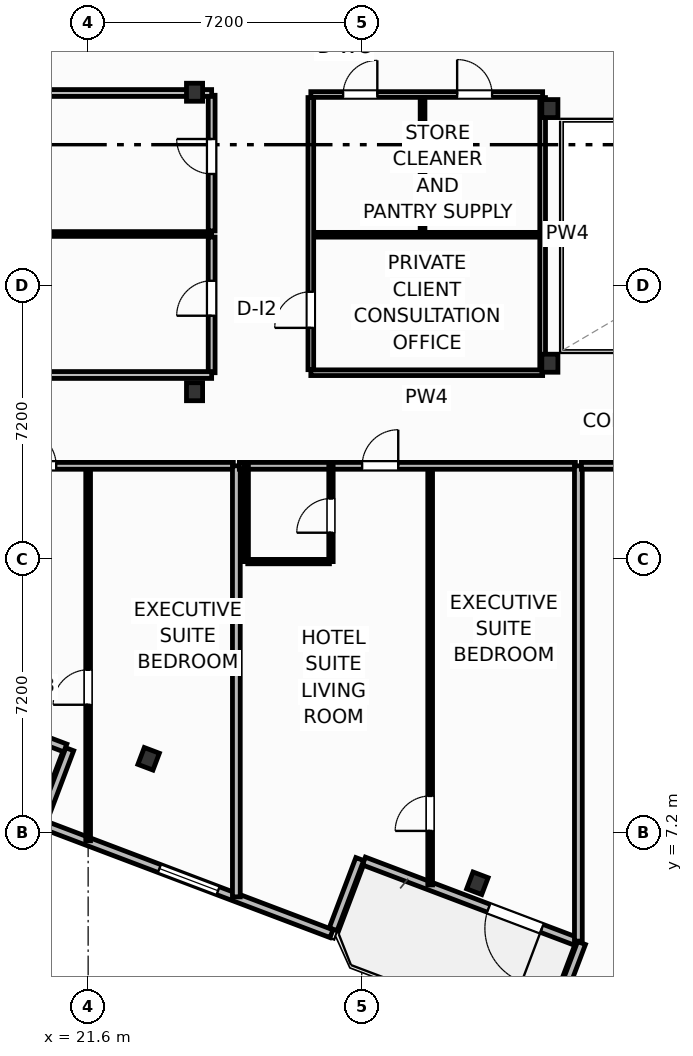
"""IFC4 building model, lengths in metres.
Left out: names, types, materials, properties, quantities, classifications, styles, units other than length and angle.
Written with IfcOpenShell. Run it as: python <this file> out.ifc"""

import sys

from ifc_helpers import new_model, si_unit, direction, frame, frame_2d, origin, origin_2d, place, context, subcontext, project, spatial, rectangle, i_section, extrude, element, fill, save


model = new_model("IFC4")
c1 = context("Model", 3, precision=1e-05, world=origin(), true_north=direction((0.0, 1.0)))
c2 = subcontext(c1, "Body", "Model", "MODEL_VIEW")
j1 = project(units=[si_unit("LENGTHUNIT", "METRE"), si_unit("PLANEANGLEUNIT", "RADIAN")], contexts=[c1])
p1 = place(None, origin())
s1 = spatial("IfcSite", under=j1, at=p1, CompositionType="ELEMENT")
p2 = place(p1, origin())
s2 = spatial("IfcBuilding", under=s1, at=p2, CompositionType="ELEMENT")
p3 = place(p2, frame((0.0, 0.0, 79.9)))
s3 = spatial("IfcBuildingStorey", under=s2, at=p3, CompositionType="ELEMENT", Elevation=79.9)
for number, where, z_axis, x_axis in (
    (1, (33.75, 19.55, 0.0), (0.0, 0.0, 1.0), (1.0, 0.0, 0.0)),
    (2, (33.75, 26.25, 0.0), (0.0, 0.0, 1.0), (1.0, 0.0, 0.0)),
    (3, (24.4, 18.8, 0.0), (0.0, 0.0, 1.0), (1.0, 0.0, 0.0)),
    (4, (24.4, 26.68, 0.0), (0.0, 0.0, 1.0), (1.0, 0.0, 0.0)),
    (5, (23.192, 9.141, 0.0), (0.0, 0.0, 1.0), (0.935, -0.354, 0.0)),
    (6, (31.843, 5.866, 0.0), (0.0, 0.0, 1.0), (0.935, -0.354, 0.0)),
):
    element("IfcColumn", number, at=place(p3, frame(where, z_axis=z_axis, x_axis=x_axis)), inside=s3, PredefinedType="COLUMN", context=c2, shape_type="SweptSolid", body=[
        extrude(i_section(OverallWidth=0.424, OverallDepth=0.474, WebThickness=0.048, FlangeThickness=0.077, FilletRadius=0.025, at=origin_2d()), origin(), (0.0, 0.0, 1.0), 3.7),
    ])
p4 = place(p3, frame((21.0, 9.425, 0.0), z_axis=(0.0, 0.0, 1.0), x_axis=(-0.93521416643, 0.354082565101, 0.0)))
e7 = element("IfcWall", 7, at=p4, inside=s3, PredefinedType="SOLIDWALL", context=c2, shape_type="SweptSolid", body=[
    extrude(rectangle(XDim=6.0, YDim=0.22, at=frame_2d((3.0, 0.0))), origin(), (0.0, 0.0, 1.0), 2.73),
])
p5 = place(p4, frame((2.176, 0.0, 0.0)))
e8 = element("IfcOpeningElement", 8, at=p5, cuts=e7, PredefinedType="OPENING", context=c2, shape_type="SweptSolid", body=[
    extrude(rectangle(XDim=1.5, YDim=2.25, at=frame_2d((0.75, 1.125))), frame((0.0, 0.12, 0.0), z_axis=(0.0, -1.0, 0.0), x_axis=(1.0, 0.0, 0.0)), (0.0, 0.0, 1.0), 0.24),
])
p6 = place(p3, frame((34.468, 4.327, 0.0), z_axis=(0.0, 0.0, 1.0), x_axis=(-0.9352192676, 0.354069091436, 0.0)))
e9 = element("IfcWall", 9, at=p6, inside=s3, PredefinedType="SOLIDWALL", context=c2, shape_type="SweptSolid", body=[
    extrude(rectangle(XDim=6.0, YDim=0.22, at=frame_2d((3.0, 0.0))), origin(), (0.0, 0.0, 1.0), 2.73),
])
p7 = place(p6, frame((0.992, 0.0, 0.0)))
e10 = element("IfcOpeningElement", 10, at=p7, cuts=e9, PredefinedType="OPENING", context=c2, shape_type="SweptSolid", body=[
    extrude(rectangle(XDim=1.5, YDim=2.25, at=frame_2d((0.75, 1.125))), frame((0.0, 0.12, 0.0), z_axis=(0.0, -1.0, 0.0), x_axis=(1.0, 0.0, 0.0)), (0.0, 0.0, 1.0), 0.24),
])
p8 = place(p3, frame((21.116, 9.392, 0.0), z_axis=(0.0, 0.0, 1.0), x_axis=(-0.353988291547, -0.935249854022, 0.0)))
e11 = element("IfcWall", 11, at=p8, inside=s3, PredefinedType="SOLIDWALL", context=c2, shape_type="SweptSolid", body=[
    extrude(rectangle(XDim=2.1, YDim=0.22, at=frame_2d((1.05, 0.0))), origin(), (0.0, 0.0, 1.0), 2.73),
])
p9 = place(p3, frame((20.49, 7.384, 0.0), z_axis=(0.0, 0.0, 1.0), x_axis=(0.935230796934, -0.354038636968, 0.0)))
e12 = element("IfcWall", 12, at=p9, inside=s3, PredefinedType="SOLIDWALL", context=c2, shape_type="SweptSolid", body=[
    extrude(rectangle(XDim=8.035, YDim=0.22, at=frame_2d((4.018, 0.0))), origin(), (0.0, 0.0, 1.0), 2.73),
])
p10 = place(p9, frame((3.192, 0.0, 0.8)))
e13 = element("IfcOpeningElement", 13, at=p10, cuts=e12, PredefinedType="OPENING", context=c2, shape_type="SweptSolid", body=[
    extrude(rectangle(XDim=1.65, YDim=1.65, at=frame_2d((0.825, 0.825))), frame((0.0, 0.12, 0.0), z_axis=(0.0, -1.0, 0.0), x_axis=(1.0, 0.0, 0.0)), (0.0, 0.0, 1.0), 0.24),
])
p11 = place(p3, frame((28.048, 4.656, 0.0), z_axis=(0.0, 0.0, 1.0), x_axis=(0.354128791944, 0.935196663123, 0.0)))
e14 = element("IfcWall", 14, at=p11, inside=s3, PredefinedType="SOLIDWALL", context=c2, shape_type="SweptSolid", body=[
    extrude(rectangle(XDim=1.975, YDim=0.22, at=frame_2d((0.988, 0.0))), origin(), (0.0, 0.0, 1.0), 2.73),
])
p12 = place(p3, frame((34.583, 4.294, 0.0), z_axis=(0.0, 0.0, 1.0), x_axis=(-0.354128469405, -0.935196785258, 0.0)))
e15 = element("IfcWall", 15, at=p12, inside=s3, PredefinedType="SOLIDWALL", context=c2, shape_type="SweptSolid", body=[
    extrude(rectangle(XDim=2.1, YDim=0.22, at=frame_2d((1.05, 0.0))), origin(), (0.0, 0.0, 1.0), 2.73),
])
p13 = place(p3, frame((21.6, 6.985, 0.0), z_axis=(0.0, 0.0, 1.0), x_axis=(0.0, 1.0, 0.0)))
e16 = element("IfcWall", 16, at=p13, inside=s3, PredefinedType="PARTITIONING", context=c2, shape_type="SweptSolid", body=[
    extrude(rectangle(XDim=9.865, YDim=0.125, at=frame_2d((4.933, 0.0))), origin(), (0.0, 0.0, 1.0), 3.45),
])
p14 = place(p13, frame((3.578, 0.0, 0.0)))
e17 = element("IfcOpeningElement", 17, at=p14, cuts=e16, PredefinedType="OPENING", context=c2, shape_type="SweptSolid", body=[
    extrude(rectangle(XDim=0.92, YDim=2.05, at=frame_2d((0.46, 1.025))), frame((0.0, 0.073, 0.0), z_axis=(0.0, -1.0, 0.0), x_axis=(1.0, 0.0, 0.0)), (0.0, 0.0, 1.0), 0.145),
])
p15 = place(p3, frame((16.58, 16.85, 0.0), z_axis=(0.0, 0.0, 1.0), x_axis=(1.0, 0.0, 0.0)))
e18 = element("IfcWall", 18, at=p15, inside=s3, PredefinedType="PARTITIONING", context=c2, shape_type="SweptSolid", body=[
    extrude(rectangle(XDim=8.84, YDim=0.18, at=frame_2d((4.42, 0.0))), origin(), (0.0, 0.0, 1.0), 3.45),
])
p16 = place(p15, frame((3.23, 0.0, 0.0)))
e19 = element("IfcOpeningElement", 19, at=p16, cuts=e18, PredefinedType="OPENING", context=c2, shape_type="SweptSolid", body=[
    extrude(rectangle(XDim=0.95, YDim=2.15, at=frame_2d((0.475, 1.075))), frame((0.0, 0.1, 0.0), z_axis=(0.0, -1.0, 0.0), x_axis=(1.0, 0.0, 0.0)), (0.0, 0.0, 1.0), 0.2),
])
p17 = place(p3, frame((25.5, 5.509, 0.0), z_axis=(0.0, 0.0, 1.0), x_axis=(0.0, 1.0, 0.0)))
e20 = element("IfcWall", 20, at=p17, inside=s3, PredefinedType="PARTITIONING", context=c2, shape_type="SweptSolid", body=[
    extrude(rectangle(XDim=11.342, YDim=0.205, at=frame_2d((5.671, 0.0))), origin(), (0.0, 0.0, 1.0), 3.45),
])
p18 = place(p3, frame((30.6, 5.823, 0.0), z_axis=(0.0, 0.0, 1.0), x_axis=(0.0, 1.0, 0.0)))
e21 = element("IfcWall", 21, at=p18, inside=s3, PredefinedType="PARTITIONING", context=c2, shape_type="SweptSolid", body=[
    extrude(rectangle(XDim=11.027, YDim=0.125, at=frame_2d((5.513, 0.0))), origin(), (0.0, 0.0, 1.0), 3.45),
])
p19 = place(p18, frame((1.42, 0.0, 0.0)))
e22 = element("IfcOpeningElement", 22, at=p19, cuts=e21, PredefinedType="OPENING", context=c2, shape_type="SweptSolid", body=[
    extrude(rectangle(XDim=0.92, YDim=2.05, at=frame_2d((0.46, 1.025))), frame((0.0, 0.073, 0.0), z_axis=(0.0, -1.0, 0.0), x_axis=(1.0, 0.0, 0.0)), (0.0, 0.0, 1.0), 0.145),
])
p20 = place(p3, frame((25.58, 16.85, 0.0), z_axis=(0.0, 0.0, 1.0), x_axis=(1.0, 0.0, 0.0)))
e23 = element("IfcWall", 23, at=p20, inside=s3, PredefinedType="PARTITIONING", context=c2, shape_type="SweptSolid", body=[
    extrude(rectangle(XDim=8.84, YDim=0.18, at=frame_2d((4.42, 0.0))), origin(), (0.0, 0.0, 1.0), 3.45),
])
p21 = place(p20, frame((3.23, 0.0, 0.0)))
e24 = element("IfcOpeningElement", 24, at=p21, cuts=e23, PredefinedType="OPENING", context=c2, shape_type="SweptSolid", body=[
    extrude(rectangle(XDim=0.95, YDim=2.15, at=frame_2d((0.475, 1.075))), frame((0.0, 0.1, 0.0), z_axis=(0.0, -1.0, 0.0), x_axis=(1.0, 0.0, 0.0)), (0.0, 0.0, 1.0), 0.2),
])
p22 = place(p3, frame((25.8, 14.33, 0.0), z_axis=(0.0, 0.0, 1.0), x_axis=(1.0, 0.0, 0.0)))
e25 = element("IfcWall", 25, at=p22, inside=s3, PredefinedType="PARTITIONING", context=c2, shape_type="SweptSolid", body=[
    extrude(rectangle(XDim=2.15, YDim=0.115, at=frame_2d((1.075, 0.0))), origin(), (0.0, 0.0, 1.0), 3.45),
])
p23 = place(p3, frame((27.99, 14.33, 0.0), z_axis=(0.0, 0.0, 1.0), x_axis=(0.0, 1.0, 0.0)))
e26 = element("IfcWall", 26, at=p23, inside=s3, PredefinedType="PARTITIONING", context=c2, shape_type="SweptSolid", body=[
    extrude(rectangle(XDim=2.52, YDim=0.115, at=frame_2d((1.26, 0.0))), origin(), (0.0, 0.0, 1.0), 3.45),
])
p24 = place(p23, frame((0.76, 0.0, 0.0)))
e27 = element("IfcOpeningElement", 27, at=p24, cuts=e26, PredefinedType="OPENING", context=c2, shape_type="SweptSolid", body=[
    extrude(rectangle(XDim=0.9, YDim=2.05, at=frame_2d((0.45, 1.025))), frame((0.0, 0.067, 0.0), z_axis=(0.0, -1.0, 0.0), x_axis=(1.0, 0.0, 0.0)), (0.0, 0.0, 1.0), 0.135),
])
p25 = place(p3, frame((25.76, 14.33, 0.0), z_axis=(0.0, 0.0, 1.0), x_axis=(0.0, 1.0, 0.0)))
e28 = element("IfcWall", 28, at=p25, inside=s3, PredefinedType="PARTITIONING", context=c2, shape_type="SweptSolid", body=[
    extrude(rectangle(XDim=2.52, YDim=0.115, at=frame_2d((1.26, 0.0))), origin(), (0.0, 0.0, 1.0), 3.45),
])
p26 = place(p3, frame((34.5, 4.344, 0.0), z_axis=(0.0, 0.0, 1.0), x_axis=(0.0, 1.0, 0.0)))
e29 = element("IfcWall", 29, at=p26, inside=s3, PredefinedType="PARTITIONING", context=c2, shape_type="SweptSolid", body=[
    extrude(rectangle(XDim=12.506, YDim=0.205, at=frame_2d((6.253, 0.0))), origin(), (0.0, 0.0, 1.0), 3.45),
])
p27 = place(p3, frame((34.58, 16.85, 0.0), z_axis=(0.0, 0.0, 1.0), x_axis=(1.0, 0.0, 0.0)))
e30 = element("IfcWall", 30, at=p27, inside=s3, PredefinedType="PARTITIONING", context=c2, shape_type="SweptSolid", body=[
    extrude(rectangle(XDim=8.84, YDim=0.18, at=frame_2d((4.42, 0.0))), origin(), (0.0, 0.0, 1.0), 3.45),
])
p28 = place(p27, frame((0.918, 0.0, 0.0)))
e31 = element("IfcOpeningElement", 31, at=p28, cuts=e30, PredefinedType="OPENING", context=c2, shape_type="SweptSolid", body=[
    extrude(rectangle(XDim=0.95, YDim=2.15, at=frame_2d((0.475, 1.075))), frame((0.0, 0.1, 0.0), z_axis=(0.0, -1.0, 0.0), x_axis=(1.0, 0.0, 0.0)), (0.0, 0.0, 1.0), 0.2),
])
p29 = place(p3, frame((24.85, 19.3, 0.0), z_axis=(0.0, 0.0, 1.0), x_axis=(0.0, 1.0, 0.0)))
e32 = element("IfcWall", 32, at=p29, inside=s3, PredefinedType="PARTITIONING", context=c2, shape_type="SweptSolid", body=[
    extrude(rectangle(XDim=3.57, YDim=0.18, at=frame_2d((1.785, 0.0))), origin(), (0.0, 0.0, 1.0), 3.45),
])
p30 = place(p29, frame((1.5, 0.0, 0.0)))
e33 = element("IfcOpeningElement", 33, at=p30, cuts=e32, PredefinedType="OPENING", context=c2, shape_type="SweptSolid", body=[
    extrude(rectangle(XDim=0.92, YDim=2.05, at=frame_2d((0.46, 1.025))), frame((0.0, 0.1, 0.0), z_axis=(0.0, -1.0, 0.0), x_axis=(1.0, 0.0, 0.0)), (0.0, 0.0, 1.0), 0.2),
])
p31 = place(p3, frame((24.85, 23.03, 0.0), z_axis=(0.0, 0.0, 1.0), x_axis=(0.0, 1.0, 0.0)))
e34 = element("IfcWall", 34, at=p31, inside=s3, PredefinedType="PARTITIONING", context=c2, shape_type="SweptSolid", body=[
    extrude(rectangle(XDim=3.57, YDim=0.18, at=frame_2d((1.785, 0.0))), origin(), (0.0, 0.0, 1.0), 3.45),
])
p32 = place(p31, frame((1.5, 0.0, 0.0)))
e35 = element("IfcOpeningElement", 35, at=p32, cuts=e34, PredefinedType="OPENING", context=c2, shape_type="SweptSolid", body=[
    extrude(rectangle(XDim=0.92, YDim=2.05, at=frame_2d((0.46, 1.025))), frame((0.0, 0.1, 0.0), z_axis=(0.0, -1.0, 0.0), x_axis=(1.0, 0.0, 0.0)), (0.0, 0.0, 1.0), 0.2),
])
p33 = place(p3, frame((1.0, 22.95, 0.0), z_axis=(0.0, 0.0, 1.0), x_axis=(1.0, 0.0, 0.0)))
e36 = element("IfcWall", 36, at=p33, inside=s3, PredefinedType="PARTITIONING", context=c2, shape_type="SweptSolid", body=[
    extrude(rectangle(XDim=23.85, YDim=0.125, at=frame_2d((11.925, 0.0))), origin(), (0.0, 0.0, 1.0), 3.45),
])
p34 = place(p3, frame((0.2, 19.24, 0.0), z_axis=(0.0, 0.0, 1.0), x_axis=(1.0, 0.0, 0.0)))
e37 = element("IfcWall", 37, at=p34, inside=s3, PredefinedType="PARTITIONING", context=c2, shape_type="SweptSolid", body=[
    extrude(rectangle(XDim=24.65, YDim=0.18, at=frame_2d((12.325, 0.0))), origin(), (0.0, 0.0, 1.0), 3.45),
])
p35 = place(p3, frame((-0.086, 26.66, 0.0), z_axis=(0.0, 0.0, 1.0), x_axis=(1.0, 0.0, 0.0)))
e38 = element("IfcWall", 38, at=p35, inside=s3, PredefinedType="PARTITIONING", context=c2, shape_type="SweptSolid", body=[
    extrude(rectangle(XDim=24.936, YDim=0.18, at=frame_2d((12.468, 0.0))), origin(), (0.0, 0.0, 1.0), 2.662),
])
p36 = place(p3, frame((27.46, 19.3, 0.0), z_axis=(0.0, 0.0, 1.0), x_axis=(1.0, 0.0, 0.0)))
e39 = element("IfcWall", 39, at=p36, inside=s3, PredefinedType="PARTITIONING", context=c2, shape_type="SweptSolid", body=[
    extrude(rectangle(XDim=6.1, YDim=0.15, at=frame_2d((3.05, 0.0))), origin(), (0.0, 0.0, 1.0), 2.662),
])
p37 = place(p3, frame((27.46, 26.62, 0.0), z_axis=(0.0, 0.0, 1.0), x_axis=(1.0, 0.0, 0.0)))
e40 = element("IfcWall", 40, at=p37, inside=s3, PredefinedType="PARTITIONING", context=c2, shape_type="SweptSolid", body=[
    extrude(rectangle(XDim=6.1, YDim=0.15, at=frame_2d((3.05, 0.0))), origin(), (0.0, 0.0, 1.0), 2.662),
])
p38 = place(p37, frame((0.85, 0.0, 0.0)))
e41 = element("IfcOpeningElement", 41, at=p38, cuts=e40, PredefinedType="OPENING", context=c2, shape_type="SweptSolid", body=[
    extrude(rectangle(XDim=0.9, YDim=2.05, at=frame_2d((0.45, 1.025))), frame((0.0, 0.085, 0.0), z_axis=(0.0, -1.0, 0.0), x_axis=(1.0, 0.0, 0.0)), (0.0, 0.0, 1.0), 0.17),
])
p39 = place(p37, frame((3.85, 0.0, 0.0)))
e42 = element("IfcOpeningElement", 42, at=p39, cuts=e40, PredefinedType="OPENING", context=c2, shape_type="SweptSolid", body=[
    extrude(rectangle(XDim=0.92, YDim=2.05, at=frame_2d((0.46, 1.025))), frame((0.0, 0.085, 0.0), z_axis=(0.0, -1.0, 0.0), x_axis=(1.0, 0.0, 0.0)), (0.0, 0.0, 1.0), 0.17),
])
p40 = place(p3, frame((27.52, 22.93, 0.0), z_axis=(0.0, 0.0, 1.0), x_axis=(1.0, 0.0, 0.0)))
e43 = element("IfcWall", 43, at=p40, inside=s3, PredefinedType="PARTITIONING", context=c2, shape_type="SweptSolid", body=[
    extrude(rectangle(XDim=6.0, YDim=0.125, at=frame_2d((3.0, 0.0))), origin(), (0.0, 0.0, 1.0), 3.45),
])
p41 = place(p3, frame((30.4, 23.0, 0.0), z_axis=(0.0, 0.0, 1.0), x_axis=(0.0, 1.0, 0.0)))
e44 = element("IfcWall", 44, at=p41, inside=s3, PredefinedType="PARTITIONING", context=c2, shape_type="SweptSolid", body=[
    extrude(rectangle(XDim=3.54, YDim=0.125, at=frame_2d((1.77, 0.0))), origin(), (0.0, 0.0, 1.0), 3.45),
])
p42 = place(p3, frame((27.46, 19.38, 0.0), z_axis=(0.0, 0.0, 1.0), x_axis=(0.0, 1.0, 0.0)))
e45 = element("IfcWall", 45, at=p42, inside=s3, PredefinedType="PARTITIONING", context=c2, shape_type="SweptSolid", body=[
    extrude(rectangle(XDim=7.16, YDim=0.15, at=frame_2d((3.58, 0.0))), origin(), (0.0, 0.0, 1.0), 3.45),
])
p43 = place(p42, frame((1.1, 0.0, 0.0)))
e46 = element("IfcOpeningElement", 46, at=p43, cuts=e45, PredefinedType="OPENING", context=c2, shape_type="SweptSolid", body=[
    extrude(rectangle(XDim=0.95, YDim=2.05, at=frame_2d((0.475, 1.025))), frame((0.0, 0.085, 0.0), z_axis=(0.0, -1.0, 0.0), x_axis=(1.0, 0.0, 0.0)), (0.0, 0.0, 1.0), 0.17),
])
p44 = place(p3, frame((33.56, 19.38, 0.0), z_axis=(0.0, 0.0, 1.0), x_axis=(0.0, 1.0, 0.0)))
e47 = element("IfcWall", 47, at=p44, inside=s3, PredefinedType="PARTITIONING", context=c2, shape_type="SweptSolid", body=[
    extrude(rectangle(XDim=7.16, YDim=0.15, at=frame_2d((3.58, 0.0))), origin(), (0.0, 0.0, 1.0), 2.824),
])
p45 = place(p7, origin())
e48 = element("IfcDoor", 48, at=p45, inside=s3, OperationType="SINGLE_SWING_LEFT", PredefinedType="DOOR", context=c2, shape_type="SweptSolid", body=[
    extrude(rectangle(XDim=1.5, YDim=2.25, at=frame_2d((0.75, 1.125))), frame((0.0, 0.025, 0.0), z_axis=(0.0, -1.0, 0.0), x_axis=(1.0, 0.0, 0.0)), (0.0, 0.0, 1.0), 0.05),
])
fill(e10, e48)
p46 = place(p10, origin())
e49 = element("IfcWindow", 49, at=p46, inside=s3, PartitioningType="SINGLE_PANEL", PredefinedType="WINDOW", context=c2, shape_type="SweptSolid", body=[
    extrude(rectangle(XDim=1.65, YDim=1.65, at=frame_2d((0.825, 0.825))), frame((0.0, 0.03, 0.0), z_axis=(0.0, -1.0, 0.0), x_axis=(1.0, 0.0, 0.0)), (0.0, 0.0, 1.0), 0.06),
])
fill(e13, e49)
p47 = place(p14, origin())
e50 = element("IfcDoor", 50, at=p47, inside=s3, OperationType="SINGLE_SWING_LEFT", PredefinedType="DOOR", context=c2, shape_type="SweptSolid", body=[
    extrude(rectangle(XDim=0.92, YDim=2.05, at=frame_2d((0.46, 1.025))), frame((0.0, 0.025, 0.0), z_axis=(0.0, -1.0, 0.0), x_axis=(1.0, 0.0, 0.0)), (0.0, 0.0, 1.0), 0.05),
])
fill(e17, e50)
p48 = place(p16, origin())
e51 = element("IfcDoor", 51, at=p48, inside=s3, OperationType="SINGLE_SWING_LEFT", PredefinedType="DOOR", context=c2, shape_type="SweptSolid", body=[
    extrude(rectangle(XDim=0.95, YDim=2.15, at=frame_2d((0.475, 1.075))), frame((0.0, 0.025, 0.0), z_axis=(0.0, -1.0, 0.0), x_axis=(1.0, 0.0, 0.0)), (0.0, 0.0, 1.0), 0.05),
])
fill(e19, e51)
p49 = place(p19, origin())
e52 = element("IfcDoor", 52, at=p49, inside=s3, OperationType="SINGLE_SWING_LEFT", PredefinedType="DOOR", context=c2, shape_type="SweptSolid", body=[
    extrude(rectangle(XDim=0.92, YDim=2.05, at=frame_2d((0.46, 1.025))), frame((0.0, 0.025, 0.0), z_axis=(0.0, -1.0, 0.0), x_axis=(1.0, 0.0, 0.0)), (0.0, 0.0, 1.0), 0.05),
])
fill(e22, e52)
p50 = place(p21, origin())
e53 = element("IfcDoor", 53, at=p50, inside=s3, OperationType="SINGLE_SWING_RIGHT", PredefinedType="DOOR", context=c2, shape_type="SweptSolid", body=[
    extrude(rectangle(XDim=0.95, YDim=2.15, at=frame_2d((0.475, 1.075))), frame((0.0, 0.025, 0.0), z_axis=(0.0, -1.0, 0.0), x_axis=(1.0, 0.0, 0.0)), (0.0, 0.0, 1.0), 0.05),
])
fill(e24, e53)
p51 = place(p24, origin())
e54 = element("IfcDoor", 54, at=p51, inside=s3, OperationType="SINGLE_SWING_LEFT", PredefinedType="DOOR", context=c2, shape_type="SweptSolid", body=[
    extrude(rectangle(XDim=0.9, YDim=2.05, at=frame_2d((0.45, 1.025))), frame((0.0, 0.025, 0.0), z_axis=(0.0, -1.0, 0.0), x_axis=(1.0, 0.0, 0.0)), (0.0, 0.0, 1.0), 0.05),
])
fill(e27, e54)
p52 = place(p30, origin())
e55 = element("IfcDoor", 55, at=p52, inside=s3, OperationType="SINGLE_SWING_LEFT", PredefinedType="DOOR", context=c2, shape_type="SweptSolid", body=[
    extrude(rectangle(XDim=0.92, YDim=2.05, at=frame_2d((0.46, 1.025))), frame((0.0, 0.025, 0.0), z_axis=(0.0, -1.0, 0.0), x_axis=(1.0, 0.0, 0.0)), (0.0, 0.0, 1.0), 0.05),
])
fill(e33, e55)
p53 = place(p32, origin())
e56 = element("IfcDoor", 56, at=p53, inside=s3, OperationType="SINGLE_SWING_RIGHT", PredefinedType="DOOR", context=c2, shape_type="SweptSolid", body=[
    extrude(rectangle(XDim=0.92, YDim=2.05, at=frame_2d((0.46, 1.025))), frame((0.0, 0.025, 0.0), z_axis=(0.0, -1.0, 0.0), x_axis=(1.0, 0.0, 0.0)), (0.0, 0.0, 1.0), 0.05),
])
fill(e35, e56)
p54 = place(p38, origin())
e57 = element("IfcDoor", 57, at=p54, inside=s3, OperationType="SINGLE_SWING_RIGHT", PredefinedType="DOOR", context=c2, shape_type="SweptSolid", body=[
    extrude(rectangle(XDim=0.9, YDim=2.05, at=frame_2d((0.45, 1.025))), frame((0.0, 0.025, 0.0), z_axis=(0.0, -1.0, 0.0), x_axis=(1.0, 0.0, 0.0)), (0.0, 0.0, 1.0), 0.05),
])
fill(e41, e57)
p55 = place(p39, origin())
e58 = element("IfcDoor", 58, at=p55, inside=s3, OperationType="SINGLE_SWING_LEFT", PredefinedType="DOOR", context=c2, shape_type="SweptSolid", body=[
    extrude(rectangle(XDim=0.92, YDim=2.05, at=frame_2d((0.46, 1.025))), frame((0.0, 0.025, 0.0), z_axis=(0.0, -1.0, 0.0), x_axis=(1.0, 0.0, 0.0)), (0.0, 0.0, 1.0), 0.05),
])
fill(e42, e58)
p56 = place(p43, origin())
e59 = element("IfcDoor", 59, at=p56, inside=s3, OperationType="SINGLE_SWING_LEFT", PredefinedType="DOOR", context=c2, shape_type="SweptSolid", body=[
    extrude(rectangle(XDim=0.95, YDim=2.05, at=frame_2d((0.475, 1.025))), frame((0.0, 0.025, 0.0), z_axis=(0.0, -1.0, 0.0), x_axis=(1.0, 0.0, 0.0)), (0.0, 0.0, 1.0), 0.05),
])
fill(e46, e59)
save(model, sys.argv[1])
